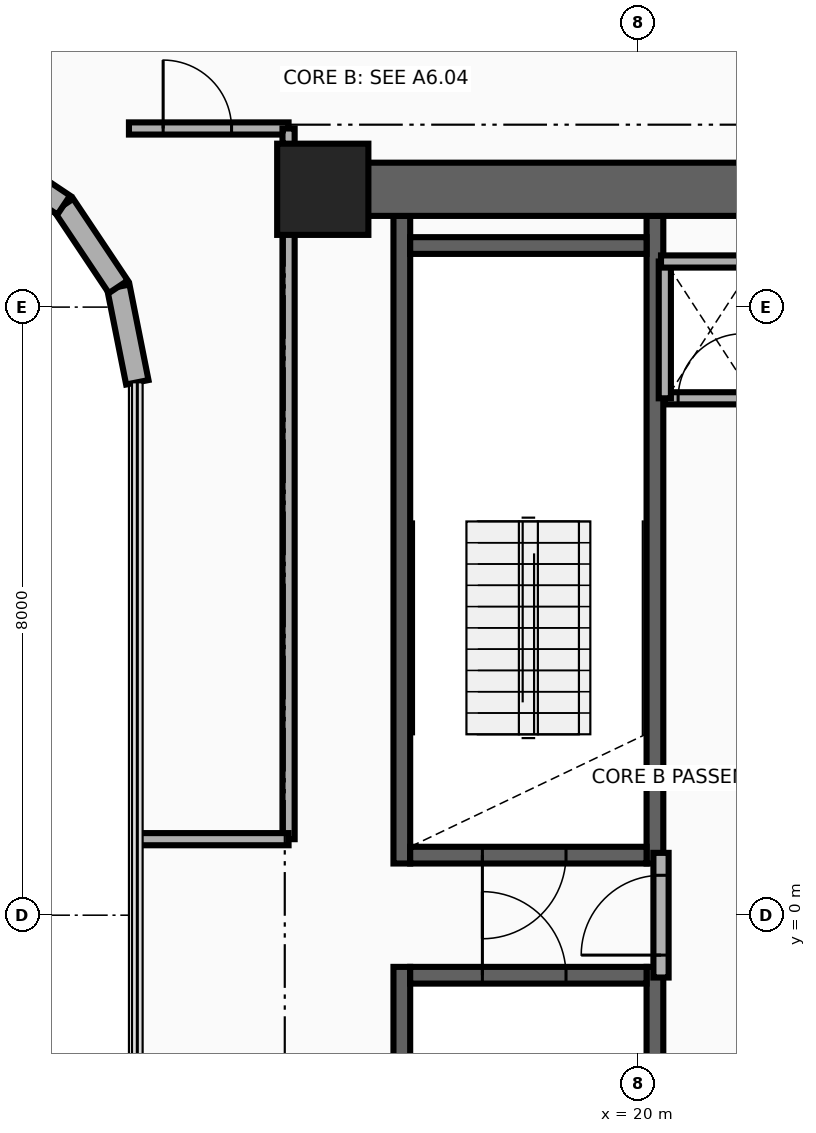
"""IFC4 building model, lengths in metres.
Left out: names, types, materials, properties, quantities, classifications, styles, units other than length and angle.
Written with IfcOpenShell. Run it as: python <this file> out.ifc"""

import sys

from ifc_helpers import new_model, si_unit, direction, frame, frame_2d, origin, origin_2d, place, context, subcontext, project, spatial, rectangle, extrude, source, transform, mapped, element, fill, save


model = new_model("IFC4")
c1 = context("Model", 3, precision=1e-05, world=origin(), true_north=direction((0.0, 1.0)))
c2 = subcontext(c1, "Body", "Model", "MODEL_VIEW")
j1 = project(units=[si_unit("LENGTHUNIT", "METRE"), si_unit("PLANEANGLEUNIT", "RADIAN")], contexts=[c1])
p1 = place(None, origin())
s1 = spatial("IfcSite", under=j1, at=p1, CompositionType="ELEMENT")
p2 = place(p1, origin())
s2 = spatial("IfcBuilding", under=s1, at=p2, CompositionType="ELEMENT")
p3 = place(p2, frame((0.0, 0.0, 150.1)))
s3 = spatial("IfcBuildingStorey", under=s2, at=p3, CompositionType="ELEMENT", Elevation=150.1)
for number, where, z_axis, x_axis in (
    (1, (16.89, 0.68, 0.0), (0.0, 0.0, 1.0), (0.0, 1.0, 0.0)),
    (2, (20.22, 0.68, 0.0), (0.0, 0.0, 1.0), (0.0, 1.0, 0.0)),
):
    element("IfcWall", number, at=place(p3, frame(where, z_axis=z_axis, x_axis=x_axis)), inside=s3, PredefinedType="SHEAR", context=c2, shape_type="SweptSolid", body=[
        extrude(rectangle(XDim=8.52, YDim=0.22, at=frame_2d((4.26, 0.0))), origin(), (0.0, 0.0, 1.0), 3.46),
    ])
p4 = place(p3, frame((17.0, 0.79, 0.0), z_axis=(0.0, 0.0, 1.0), x_axis=(1.0, 0.0, 0.0)))
e3 = element("IfcWall", 3, at=p4, inside=s3, PredefinedType="SHEAR", context=c2, shape_type="SweptSolid", body=[
    extrude(rectangle(XDim=3.11, YDim=0.22, at=frame_2d((1.555, 0.0))), origin(), (0.0, 0.0, 1.0), 3.46),
])
p5 = place(p4, frame((0.95, 0.0, 0.0)))
e4 = element("IfcOpeningElement", 4, at=p5, cuts=e3, PredefinedType="OPENING", context=c2, shape_type="SweptSolid", body=[
    extrude(rectangle(XDim=1.1, YDim=2.15, at=frame_2d((0.55, 1.075))), frame((0.0, 0.125, 0.0), z_axis=(0.0, -1.0, 0.0), x_axis=(1.0, 0.0, 0.0)), (0.0, 0.0, 1.0), 0.25),
])
p6 = place(p3, frame((17.0, 8.81, 0.0), z_axis=(0.0, 0.0, 1.0), x_axis=(1.0, 0.0, 0.0)))
e5 = element("IfcWall", 5, at=p6, inside=s3, PredefinedType="SHEAR", context=c2, shape_type="SweptSolid", body=[
    extrude(rectangle(XDim=3.11, YDim=0.22, at=frame_2d((1.555, 0.0))), origin(), (0.0, 0.0, 1.0), 3.46),
])
for number, where, z_axis, x_axis in (
    (6, (16.89, -9.2, 0.0), (0.0, 0.0, 1.0), (0.0, 1.0, 0.0)),
    (7, (20.22, -9.2, 0.0), (0.0, 0.0, 1.0), (0.0, 1.0, 0.0)),
):
    element("IfcWall", number, at=place(p3, frame(where, z_axis=z_axis, x_axis=x_axis)), inside=s3, PredefinedType="SHEAR", context=c2, shape_type="SweptSolid", body=[
        extrude(rectangle(XDim=8.52, YDim=0.22, at=frame_2d((4.26, 0.0))), origin(), (0.0, 0.0, 1.0), 3.46),
    ])
p7 = place(p3, frame((17.0, -0.79, 0.0), z_axis=(0.0, 0.0, 1.0), x_axis=(1.0, 0.0, 0.0)))
e8 = element("IfcWall", 8, at=p7, inside=s3, PredefinedType="SHEAR", context=c2, shape_type="SweptSolid", body=[
    extrude(rectangle(XDim=3.11, YDim=0.22, at=frame_2d((1.555, 0.0))), origin(), (0.0, 0.0, 1.0), 3.46),
])
p8 = place(p7, frame((0.95, 0.0, 0.0)))
e9 = element("IfcOpeningElement", 9, at=p8, cuts=e8, PredefinedType="OPENING", context=c2, shape_type="SweptSolid", body=[
    extrude(rectangle(XDim=1.1, YDim=2.15, at=frame_2d((0.55, 1.075))), frame((0.0, 0.125, 0.0), z_axis=(0.0, -1.0, 0.0), x_axis=(1.0, 0.0, 0.0)), (0.0, 0.0, 1.0), 0.25),
])
p9 = place(p3, frame((15.85, 9.55, 0.0), z_axis=(0.0, 0.0, 1.0), x_axis=(1.0, 0.0, 0.0)))
e10 = element("IfcWall", 10, at=p9, inside=s3, PredefinedType="SHEAR", context=c2, shape_type="SweptSolid", body=[
    extrude(rectangle(XDim=9.0, YDim=0.7, at=frame_2d((4.5, 0.0))), origin(), (0.0, 0.0, 1.0), 3.46),
])
m1 = source(origin(), c2, "Body", "SweptSolid", [
    extrude(rectangle(XDim=1.2, YDim=1.2, at=origin_2d()), origin(), (0.0, 0.0, 1.0), 3.7),
])
p10 = place(p3, frame((15.85, 9.55, 0.0), z_axis=(0.0, 0.0, 1.0), x_axis=(1.0, 0.0, 0.0)))
e11 = element("IfcColumn", 11, at=p10, inside=s3, PredefinedType="COLUMN", context=c2, shape_type="MappedRepresentation", body=[
    mapped(m1, transform((0.0, 0.0, 0.0), x_axis=(1.0, 0.0, 0.0), y_axis=(0.0, 1.0, 0.0), z_axis=(0.0, 0.0, 1.0), scale=1.0)),
])
p11 = place(p3, frame((13.41, 7.011, 0.0), z_axis=(0.0, 0.0, 1.0), x_axis=(-0.195090163074, 0.980785312019, 0.0)))
e12 = element("IfcWall", 12, at=p11, inside=s3, PredefinedType="SOLIDWALL", context=c2, shape_type="SweptSolid", body=[
    extrude(rectangle(XDim=1.281, YDim=0.3, at=frame_2d((0.641, 0.0))), origin(), (0.0, 0.0, 1.0), 3.46),
])
for number, where, z_axis, x_axis in (
    (13, (13.16, 8.268, 0.0), (0.0, 0.0, 1.0), (-0.556, 0.831, 0.0)),
    (14, (12.442, 9.342, 0.0), (0.0, 0.0, 1.0), (-0.831, 0.556, 0.0)),
):
    element("IfcWall", number, at=place(p3, frame(where, z_axis=z_axis, x_axis=x_axis)), inside=s3, PredefinedType="SOLIDWALL", context=c2, shape_type="SweptSolid", body=[
        extrude(rectangle(XDim=1.292, YDim=0.3, at=frame_2d((0.646, 0.0))), origin(), (0.0, 0.0, 1.0), 3.46),
    ])
p12 = place(p3, frame((20.3, -0.82, 0.0), z_axis=(0.0, 0.0, 1.0), x_axis=(0.0, 1.0, 0.0)))
e15 = element("IfcWall", 15, at=p12, inside=s3, PredefinedType="PARTITIONING", context=c2, shape_type="SweptSolid", body=[
    extrude(rectangle(XDim=1.64, YDim=0.2, at=frame_2d((0.82, 0.0))), origin(), (0.0, 0.0, 1.0), 3.46),
])
p13 = place(p12, frame((0.295, 0.0, 0.0)))
e16 = element("IfcOpeningElement", 16, at=p13, cuts=e15, PredefinedType="OPENING", context=c2, shape_type="SweptSolid", body=[
    extrude(rectangle(XDim=1.05, YDim=2.15, at=frame_2d((0.525, 1.075))), frame((0.0, 0.115, 0.0), z_axis=(0.0, -1.0, 0.0), x_axis=(1.0, 0.0, 0.0)), (0.0, 0.0, 1.0), 0.23),
])
p14 = place(p3, frame((20.35, 6.8, 0.0), z_axis=(0.0, 0.0, 1.0), x_axis=(1.0, 0.0, 0.0)))
e17 = element("IfcWall", 17, at=p14, inside=s3, PredefinedType="PARTITIONING", context=c2, shape_type="SweptSolid", body=[
    extrude(rectangle(XDim=1.2, YDim=0.16, at=frame_2d((0.6, 0.0))), origin(), (0.0, 0.0, 1.0), 3.46),
])
p15 = place(p14, frame((0.175, 0.0, 0.0)))
e18 = element("IfcOpeningElement", 18, at=p15, cuts=e17, PredefinedType="OPENING", context=c2, shape_type="SweptSolid", body=[
    extrude(rectangle(XDim=0.85, YDim=2.05, at=frame_2d((0.425, 1.025))), frame((0.0, 0.095, 0.0), z_axis=(0.0, -1.0, 0.0), x_axis=(1.0, 0.0, 0.0)), (0.0, 0.0, 1.0), 0.19),
])
p16 = place(p3, frame((20.35, 6.8, 0.0), z_axis=(0.0, 0.0, 1.0), x_axis=(0.0, 1.0, 0.0)))
e19 = element("IfcWall", 19, at=p16, inside=s3, PredefinedType="PARTITIONING", context=c2, shape_type="SweptSolid", body=[
    extrude(rectangle(XDim=1.8, YDim=0.16, at=frame_2d((0.9, 0.0))), origin(), (0.0, 0.0, 1.0), 3.46),
])
p17 = place(p3, frame((20.3, 8.6, 0.0), z_axis=(0.0, 0.0, 1.0), x_axis=(1.0, 0.0, 0.0)))
e20 = element("IfcWall", 20, at=p17, inside=s3, PredefinedType="PARTITIONING", context=c2, shape_type="SweptSolid", body=[
    extrude(rectangle(XDim=1.82, YDim=0.16, at=frame_2d((0.91, 0.0))), origin(), (0.0, 0.0, 1.0), 3.46),
])
p18 = place(p3, frame((13.3, 10.35, 0.0), z_axis=(0.0, 0.0, 1.0), x_axis=(1.0, 0.0, 0.0)))
e21 = element("IfcWall", 21, at=p18, inside=s3, PredefinedType="PARTITIONING", context=c2, shape_type="SweptSolid", body=[
    extrude(rectangle(XDim=2.1, YDim=0.16, at=frame_2d((1.05, 0.0))), origin(), (0.0, 0.0, 1.0), 2.666),
])
p19 = place(p18, frame((0.45, 0.0, 0.0)))
e22 = element("IfcOpeningElement", 22, at=p19, cuts=e21, PredefinedType="OPENING", context=c2, shape_type="SweptSolid", body=[
    extrude(rectangle(XDim=0.9, YDim=2.1, at=frame_2d((0.45, 1.05))), frame((0.0, 0.095, 0.0), z_axis=(0.0, -1.0, 0.0), x_axis=(1.0, 0.0, 0.0)), (0.0, 0.0, 1.0), 0.19),
])
p20 = place(p3, frame((15.4, 1.0, 0.0), z_axis=(0.0, 0.0, 1.0), x_axis=(0.0, 1.0, 0.0)))
e23 = element("IfcWall", 23, at=p20, inside=s3, PredefinedType="PARTITIONING", context=c2, shape_type="SweptSolid", body=[
    extrude(rectangle(XDim=9.35, YDim=0.16, at=frame_2d((4.675, 0.0))), origin(), (0.0, 0.0, 1.0), 2.245),
])
p21 = place(p3, frame((13.41, 1.0, 0.0), z_axis=(0.0, 0.0, 1.0), x_axis=(1.0, 0.0, 0.0)))
e24 = element("IfcWall", 24, at=p21, inside=s3, PredefinedType="PARTITIONING", context=c2, shape_type="SweptSolid", body=[
    extrude(rectangle(XDim=1.99, YDim=0.16, at=frame_2d((0.995, 0.0))), origin(), (0.0, 0.0, 1.0), 2.245),
])
p22 = place(p13, origin())
e25 = element("IfcDoor", 25, at=p22, inside=s3, OperationType="SINGLE_SWING_RIGHT", PredefinedType="DOOR", context=c2, shape_type="SweptSolid", body=[
    extrude(rectangle(XDim=1.05, YDim=2.15, at=frame_2d((0.525, 1.075))), frame((0.0, 0.025, 0.0), z_axis=(0.0, -1.0, 0.0), x_axis=(1.0, 0.0, 0.0)), (0.0, 0.0, 1.0), 0.05),
])
fill(e16, e25)
p23 = place(p5, frame((1.1, 0.0, 0.0), z_axis=(0.0, 0.0, 1.0), x_axis=(-1.0, 0.0, 0.0)))
e26 = element("IfcDoor", 26, at=p23, inside=s3, OperationType="SINGLE_SWING_LEFT", PredefinedType="DOOR", context=c2, shape_type="SweptSolid", body=[
    extrude(rectangle(XDim=1.1, YDim=2.15, at=frame_2d((0.55, 1.075))), frame((0.0, 0.025, 0.0), z_axis=(0.0, -1.0, 0.0), x_axis=(1.0, 0.0, 0.0)), (0.0, 0.0, 1.0), 0.05),
])
fill(e4, e26)
p24 = place(p8, origin())
e27 = element("IfcDoor", 27, at=p24, inside=s3, OperationType="SINGLE_SWING_RIGHT", PredefinedType="DOOR", context=c2, shape_type="SweptSolid", body=[
    extrude(rectangle(XDim=1.1, YDim=2.15, at=frame_2d((0.55, 1.075))), frame((0.0, 0.025, 0.0), z_axis=(0.0, -1.0, 0.0), x_axis=(1.0, 0.0, 0.0)), (0.0, 0.0, 1.0), 0.05),
])
fill(e9, e27)
p25 = place(p15, origin())
e28 = element("IfcDoor", 28, at=p25, inside=s3, OperationType="SINGLE_SWING_LEFT", PredefinedType="DOOR", context=c2, shape_type="SweptSolid", body=[
    extrude(rectangle(XDim=0.85, YDim=2.05, at=frame_2d((0.425, 1.025))), frame((0.0, 0.025, 0.0), z_axis=(0.0, -1.0, 0.0), x_axis=(1.0, 0.0, 0.0)), (0.0, 0.0, 1.0), 0.05),
])
fill(e18, e28)
p26 = place(p19, origin())
e29 = element("IfcDoor", 29, at=p26, inside=s3, OperationType="SINGLE_SWING_RIGHT", PredefinedType="DOOR", context=c2, shape_type="SweptSolid", body=[
    extrude(rectangle(XDim=0.9, YDim=2.1, at=frame_2d((0.45, 1.05))), frame((0.0, 0.025, 0.0), z_axis=(0.0, -1.0, 0.0), x_axis=(1.0, 0.0, 0.0)), (0.0, 0.0, 1.0), 0.05),
])
fill(e22, e29)
save(model, sys.argv[1])
